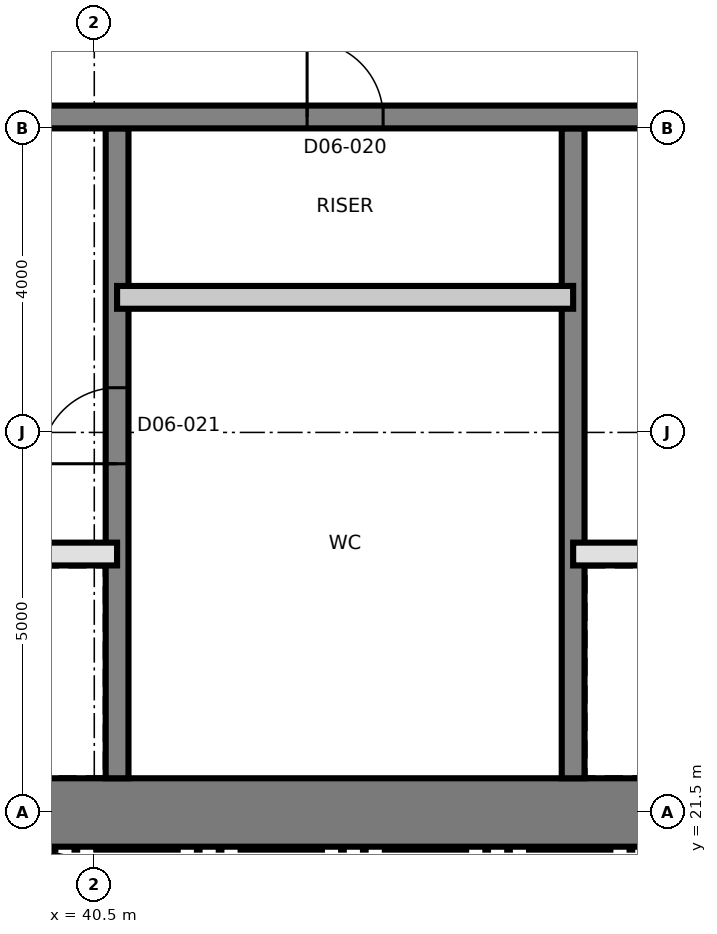
"""IFC4 building model, lengths in metres.
Left out: names, types, materials, properties, quantities, classifications, styles, units other than length and angle.
Written with IfcOpenShell. Run it as: python <this file> out.ifc"""

import sys

from ifc_helpers import new_model, si_unit, direction, frame, frame_2d, origin, place, context, subcontext, project, spatial, rectangle, extrude, element, fill, save


model = new_model("IFC4")
c1 = context("Model", 3, precision=1e-05, world=origin(), true_north=direction((0.0, 1.0)))
c2 = subcontext(c1, "Body", "Model", "MODEL_VIEW")
j1 = project(units=[si_unit("LENGTHUNIT", "METRE"), si_unit("PLANEANGLEUNIT", "RADIAN")], contexts=[c1])
p1 = place(None, origin())
s1 = spatial("IfcSite", under=j1, at=p1, CompositionType="ELEMENT")
p2 = place(p1, origin())
s2 = spatial("IfcBuilding", under=s1, at=p2, CompositionType="ELEMENT")
p3 = place(p2, frame((0.0, 0.0, 81.6)))
s3 = spatial("IfcBuildingStorey", under=s2, at=p3, CompositionType="ELEMENT", Elevation=81.6)
p4 = place(p3, frame((31.05, 21.5, 0.0), z_axis=(0.0, 0.0, 1.0), x_axis=(1.0, 0.0, 0.0)))
e1 = element("IfcWall", 1, at=p4, inside=s3, PredefinedType="SHEAR", context=c2, shape_type="SweptSolid", body=[
    extrude(rectangle(XDim=27.0, YDim=0.9, at=frame_2d((13.5, 0.0))), origin(), (0.0, 0.0, 1.0), 5.5),
])
p5 = place(p3, frame((40.8, 21.95, 0.0), z_axis=(0.0, 0.0, 1.0), x_axis=(0.0, 1.0, 0.0)))
e2 = element("IfcWall", 2, at=p5, inside=s3, PredefinedType="SHEAR", context=c2, shape_type="SweptSolid", body=[
    extrude(rectangle(XDim=8.55, YDim=0.3, at=frame_2d((4.275, 0.0))), origin(), (0.0, 0.0, 1.0), 5.5),
])
p6 = place(p5, frame((4.138, 0.0, 0.0)))
e3 = element("IfcOpeningElement", 3, at=p6, cuts=e2, PredefinedType="OPENING", context=c2, shape_type="SweptSolid", body=[
    extrude(rectangle(XDim=1.0, YDim=2.1, at=frame_2d((0.5, 1.05))), frame((0.0, 0.16, 0.0), z_axis=(0.0, -1.0, 0.0), x_axis=(1.0, 0.0, 0.0)), (0.0, 0.0, 1.0), 0.32),
])
p7 = place(p3, frame((46.8, 21.95, 0.0), z_axis=(0.0, 0.0, 1.0), x_axis=(0.0, 1.0, 0.0)))
e4 = element("IfcWall", 4, at=p7, inside=s3, PredefinedType="SHEAR", context=c2, shape_type="SweptSolid", body=[
    extrude(rectangle(XDim=8.55, YDim=0.3, at=frame_2d((4.275, 0.0))), origin(), (0.0, 0.0, 1.0), 5.5),
])
p8 = place(p3, frame((31.95, 30.65, 0.0), z_axis=(0.0, 0.0, 1.0), x_axis=(1.0, 0.0, 0.0)))
e5 = element("IfcWall", 5, at=p8, inside=s3, PredefinedType="SHEAR", context=c2, shape_type="SweptSolid", body=[
    extrude(rectangle(XDim=26.1, YDim=0.3, at=frame_2d((13.05, 0.0))), origin(), (0.0, 0.0, 1.0), 5.5),
])
p9 = place(p8, frame((24.55, 0.0, 0.0)))
e6 = element("IfcOpeningElement", 6, at=p9, cuts=e5, PredefinedType="OPENING", context=c2, shape_type="SweptSolid", body=[
    extrude(rectangle(XDim=1.0, YDim=2.1, at=frame_2d((0.5, 1.05))), frame((0.0, 0.16, 0.0), z_axis=(0.0, -1.0, 0.0), x_axis=(1.0, 0.0, 0.0)), (0.0, 0.0, 1.0), 0.32),
])
p10 = place(p8, frame((11.35, 0.0, 0.0)))
e7 = element("IfcOpeningElement", 7, at=p10, cuts=e5, PredefinedType="OPENING", context=c2, shape_type="SweptSolid", body=[
    extrude(rectangle(XDim=1.0, YDim=2.1, at=frame_2d((0.5, 1.05))), frame((0.0, 0.16, 0.0), z_axis=(0.0, -1.0, 0.0), x_axis=(1.0, 0.0, 0.0)), (0.0, 0.0, 1.0), 0.32),
])
p11 = place(p3, frame((39.735, 20.846, 0.0), z_axis=(0.0, 0.0, 1.0), x_axis=(0.97206095595, -0.234728562212, 0.0)))
e8 = element("IfcWall", 8, at=p11, inside=s3, PredefinedType="SOLIDWALL", context=c2, shape_type="SweptSolid", body=[
    extrude(rectangle(XDim=2.35, YDim=0.3, at=frame_2d((1.175, 0.0))), origin(), (0.0, 0.0, 1.0), 5.2),
])
p12 = place(p3, frame((31.8, 24.9, 0.0), z_axis=(0.0, 0.0, 1.0), x_axis=(1.0, 0.0, 0.0)))
e9 = element("IfcWall", 9, at=p12, inside=s3, PredefinedType="SOLIDWALL", context=c2, shape_type="SweptSolid", body=[
    extrude(rectangle(XDim=9.0, YDim=0.3, at=frame_2d((4.5, 0.0))), origin(), (0.0, 0.0, 1.0), 5.2),
])
p13 = place(p12, frame((7.05, 0.0, 0.0)))
e10 = element("IfcOpeningElement", 10, at=p13, cuts=e9, PredefinedType="OPENING", context=c2, shape_type="SweptSolid", body=[
    extrude(rectangle(XDim=0.9, YDim=2.1, at=frame_2d((0.45, 1.05))), frame((0.0, 0.16, 0.0), z_axis=(0.0, -1.0, 0.0), x_axis=(1.0, 0.0, 0.0)), (0.0, 0.0, 1.0), 0.32),
])
p14 = place(p12, frame((0.95, 0.0, 0.0)))
e11 = element("IfcOpeningElement", 11, at=p14, cuts=e9, PredefinedType="OPENING", context=c2, shape_type="SweptSolid", body=[
    extrude(rectangle(XDim=1.1, YDim=2.4, at=frame_2d((0.55, 1.2))), frame((0.0, 0.16, 0.0), z_axis=(0.0, -1.0, 0.0), x_axis=(1.0, 0.0, 0.0)), (0.0, 0.0, 1.0), 0.32),
])
p15 = place(p12, frame((3.95, 0.0, 0.0)))
e12 = element("IfcOpeningElement", 12, at=p15, cuts=e9, PredefinedType="OPENING", context=c2, shape_type="SweptSolid", body=[
    extrude(rectangle(XDim=1.1, YDim=2.4, at=frame_2d((0.55, 1.2))), frame((0.0, 0.16, 0.0), z_axis=(0.0, -1.0, 0.0), x_axis=(1.0, 0.0, 0.0)), (0.0, 0.0, 1.0), 0.32),
])
p16 = place(p3, frame((46.8, 24.9, 0.0), z_axis=(0.0, 0.0, 1.0), x_axis=(1.0, 0.0, 0.0)))
e13 = element("IfcWall", 13, at=p16, inside=s3, PredefinedType="SOLIDWALL", context=c2, shape_type="SweptSolid", body=[
    extrude(rectangle(XDim=9.0, YDim=0.3, at=frame_2d((4.5, 0.0))), origin(), (0.0, 0.0, 1.0), 5.2),
])
p17 = place(p16, frame((1.05, 0.0, 0.0)))
e14 = element("IfcOpeningElement", 14, at=p17, cuts=e13, PredefinedType="OPENING", context=c2, shape_type="SweptSolid", body=[
    extrude(rectangle(XDim=0.9, YDim=2.1, at=frame_2d((0.45, 1.05))), frame((0.0, 0.16, 0.0), z_axis=(0.0, -1.0, 0.0), x_axis=(1.0, 0.0, 0.0)), (0.0, 0.0, 1.0), 0.32),
])
p18 = place(p3, frame((40.8, 28.277, 0.0), z_axis=(0.0, 0.0, 1.0), x_axis=(1.0, 0.0, 0.0)))
e15 = element("IfcWall", 15, at=p18, inside=s3, PredefinedType="PARTITIONING", context=c2, shape_type="SweptSolid", body=[
    extrude(rectangle(XDim=6.0, YDim=0.3, at=frame_2d((3.0, 0.0))), origin(), (0.0, 0.0, 1.0), 5.2),
])
p19 = place(p10, origin())
e16 = element("IfcDoor", 16, at=p19, inside=s3, OperationType="SINGLE_SWING_LEFT", PredefinedType="DOOR", context=c2, shape_type="SweptSolid", body=[
    extrude(rectangle(XDim=1.0, YDim=2.1, at=frame_2d((0.5, 1.05))), frame((0.0, 0.025, 0.0), z_axis=(0.0, -1.0, 0.0), x_axis=(1.0, 0.0, 0.0)), (0.0, 0.0, 1.0), 0.05),
])
fill(e7, e16)
p20 = place(p6, origin())
e17 = element("IfcDoor", 17, at=p20, inside=s3, OperationType="SINGLE_SWING_RIGHT", PredefinedType="DOOR", context=c2, shape_type="SweptSolid", body=[
    extrude(rectangle(XDim=1.0, YDim=2.1, at=frame_2d((0.5, 1.05))), frame((0.0, 0.025, 0.0), z_axis=(0.0, -1.0, 0.0), x_axis=(1.0, 0.0, 0.0)), (0.0, 0.0, 1.0), 0.05),
])
fill(e3, e17)
save(model, sys.argv[1])
